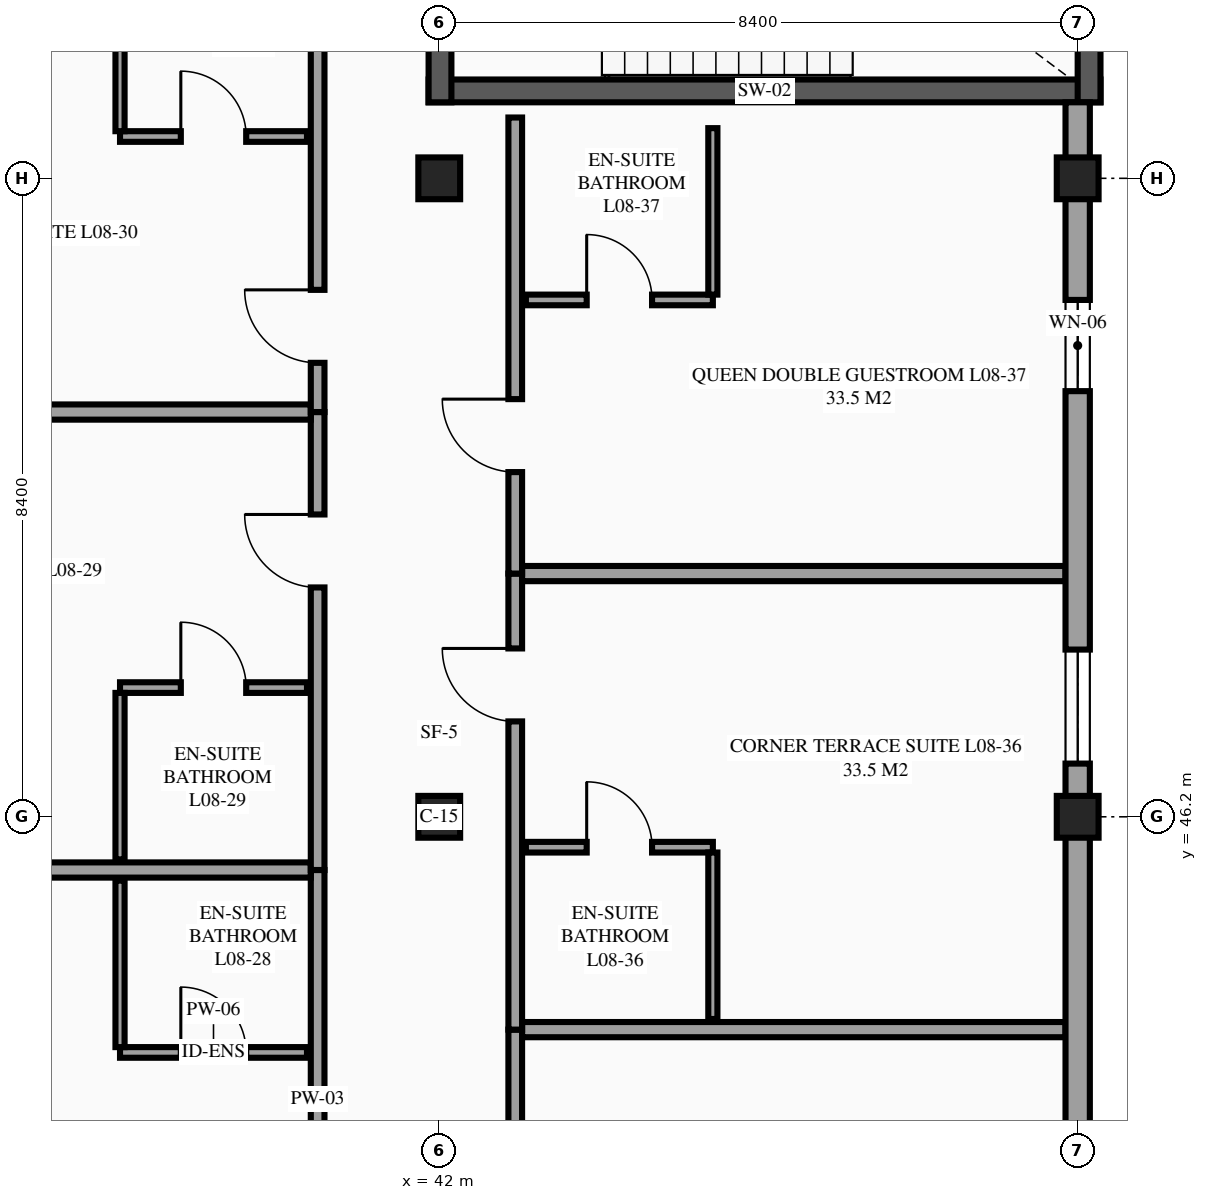
"""IFC4 building model, lengths in metres.
Left out: names, types, materials, properties, quantities, classifications, styles, units other than length and angle.
Written with IfcOpenShell. Run it as: python <this file> out.ifc"""

import sys

from ifc_helpers import new_model, si_unit, direction, frame, frame_2d, origin, origin_2d, place, context, subcontext, project, spatial, rectangle, extrude, element, fill, save


model = new_model("IFC4")
c1 = context("Model", 3, precision=1e-05, world=origin(), true_north=direction((0.0, 1.0)))
c2 = subcontext(c1, "Body", "Model", "MODEL_VIEW")
j1 = project(units=[si_unit("LENGTHUNIT", "METRE"), si_unit("PLANEANGLEUNIT", "RADIAN")], contexts=[c1])
p1 = place(None, origin())
s1 = spatial("IfcSite", under=j1, at=p1, CompositionType="ELEMENT")
p2 = place(p1, origin())
s2 = spatial("IfcBuilding", under=s1, at=p2, CompositionType="ELEMENT")
p3 = place(p2, frame((0.0, 0.0, 32.7)))
s3 = spatial("IfcBuildingStorey", under=s2, at=p3, CompositionType="ELEMENT", Elevation=32.7)
for number, where, z_axis, x_axis in (
    (1, (42.0, 46.2, 0.0), (0.0, 0.0, 1.0), (1.0, 0.0, 0.0)),
    (2, (42.0, 54.6, 0.0), (0.0, 0.0, 1.0), (1.0, 0.0, 0.0)),
    (3, (50.4, 46.2, 0.0), (0.0, 0.0, 1.0), (1.0, 0.0, 0.0)),
    (4, (50.4, 54.6, 0.0), (0.0, 0.0, 1.0), (1.0, 0.0, 0.0)),
):
    element("IfcColumn", number, at=place(p3, frame(where, z_axis=z_axis, x_axis=x_axis)), inside=s3, PredefinedType="COLUMN", context=c2, shape_type="SweptSolid", body=[
        extrude(rectangle(XDim=0.55, YDim=0.55, at=origin_2d()), origin(), (0.0, 0.0, 1.0), 3.6),
    ])
p4 = place(p3, frame((41.86, 55.75, 0.0), z_axis=(0.0, 0.0, 1.0), x_axis=(1.0, 0.0, 0.0)))
e5 = element("IfcWall", 5, at=p4, inside=s3, PredefinedType="SHEAR", context=c2, shape_type="SweptSolid", body=[
    extrude(rectangle(XDim=8.84, YDim=0.3, at=frame_2d((4.42, 0.0))), origin(), (0.0, 0.0, 1.0), 3.6),
])
p5 = place(p3, frame((50.55, 55.6, 0.0), z_axis=(0.0, 0.0, 1.0), x_axis=(0.0, 1.0, 0.0)))
e6 = element("IfcWall", 6, at=p5, inside=s3, PredefinedType="SHEAR", context=c2, shape_type="SweptSolid", body=[
    extrude(rectangle(XDim=5.2, YDim=0.3, at=frame_2d((2.6, 0.0))), origin(), (0.0, 0.0, 1.0), 3.6),
])
p6 = place(p3, frame((42.01, 60.8, 0.0), z_axis=(0.0, 0.0, 1.0), x_axis=(0.0, -1.0, 0.0)))
e7 = element("IfcWall", 7, at=p6, inside=s3, PredefinedType="SHEAR", context=c2, shape_type="SweptSolid", body=[
    extrude(rectangle(XDim=5.2, YDim=0.3, at=frame_2d((2.6, 0.0))), origin(), (0.0, 0.0, 1.0), 3.6),
])
p7 = place(p6, frame((3.0, 0.0, 0.0)))
e8 = element("IfcOpeningElement", 8, at=p7, cuts=e7, PredefinedType="OPENING", context=c2, shape_type="SweptSolid", body=[
    extrude(rectangle(XDim=1.15, YDim=2.15, at=frame_2d((0.575, 1.075))), frame((0.0, 0.16, 0.0), z_axis=(0.0, -1.0, 0.0), x_axis=(1.0, 0.0, 0.0)), (0.0, 0.0, 1.0), 0.32),
])
p8 = place(p3, frame((40.4, 39.475, 0.0), z_axis=(0.0, 0.0, 1.0), x_axis=(0.0, 1.0, 0.0)))
e9 = element("IfcWall", 9, at=p8, inside=s3, PredefinedType="PARTITIONING", context=c2, shape_type="SweptSolid", body=[
    extrude(rectangle(XDim=6.025, YDim=0.18, at=frame_2d((3.012, 0.0))), origin(), (0.0, 0.0, 1.0), 3.375),
])
p9 = place(p8, frame((1.347, 0.0, 0.0)))
e10 = element("IfcOpeningElement", 10, at=p9, cuts=e9, PredefinedType="OPENING", context=c2, shape_type="SweptSolid", body=[
    extrude(rectangle(XDim=0.96, YDim=2.15, at=frame_2d((0.48, 1.075))), frame((0.0, 0.1, 0.0), z_axis=(0.0, -1.0, 0.0), x_axis=(1.0, 0.0, 0.0)), (0.0, 0.0, 1.0), 0.2),
])
p10 = place(p3, frame((33.76, 45.5, 0.0), z_axis=(0.0, 0.0, 1.0), x_axis=(1.0, 0.0, 0.0)))
e11 = element("IfcWall", 11, at=p10, inside=s3, PredefinedType="PARTITIONING", context=c2, shape_type="SweptSolid", body=[
    extrude(rectangle(XDim=6.55, YDim=0.2, at=frame_2d((3.275, 0.0))), origin(), (0.0, 0.0, 1.0), 3.375),
])
p11 = place(p3, frame((37.8, 43.1, 0.0), z_axis=(0.0, 0.0, 1.0), x_axis=(1.0, 0.0, 0.0)))
e12 = element("IfcWall", 12, at=p11, inside=s3, PredefinedType="PARTITIONING", context=c2, shape_type="SweptSolid", body=[
    extrude(rectangle(XDim=2.46, YDim=0.14, at=frame_2d((1.23, 0.0))), origin(), (0.0, 0.0, 1.0), 3.375),
])
p12 = place(p11, frame((0.8, 0.0, 0.0)))
e13 = element("IfcOpeningElement", 13, at=p12, cuts=e12, PredefinedType="OPENING", context=c2, shape_type="SweptSolid", body=[
    extrude(rectangle(XDim=0.86, YDim=2.1, at=frame_2d((0.43, 1.05))), frame((0.0, 0.08, 0.0), z_axis=(0.0, -1.0, 0.0), x_axis=(1.0, 0.0, 0.0)), (0.0, 0.0, 1.0), 0.16),
])
p13 = place(p3, frame((37.8, 43.17, 0.0), z_axis=(0.0, 0.0, 1.0), x_axis=(0.0, 1.0, 0.0)))
e14 = element("IfcWall", 14, at=p13, inside=s3, PredefinedType="PARTITIONING", context=c2, shape_type="SweptSolid", body=[
    extrude(rectangle(XDim=2.19, YDim=0.12, at=frame_2d((1.095, 0.0))), origin(), (0.0, 0.0, 1.0), 3.375),
])
p14 = place(p3, frame((40.4, 45.5, 0.0), z_axis=(0.0, 0.0, 1.0), x_axis=(0.0, 1.0, 0.0)))
e15 = element("IfcWall", 15, at=p14, inside=s3, PredefinedType="PARTITIONING", context=c2, shape_type="SweptSolid", body=[
    extrude(rectangle(XDim=6.025, YDim=0.18, at=frame_2d((3.012, 0.0))), origin(), (0.0, 0.0, 1.0), 3.375),
])
p15 = place(p14, frame((3.718, 0.0, 0.0)))
e16 = element("IfcOpeningElement", 16, at=p15, cuts=e15, PredefinedType="OPENING", context=c2, shape_type="SweptSolid", body=[
    extrude(rectangle(XDim=0.96, YDim=2.15, at=frame_2d((0.48, 1.075))), frame((0.0, 0.1, 0.0), z_axis=(0.0, -1.0, 0.0), x_axis=(1.0, 0.0, 0.0)), (0.0, 0.0, 1.0), 0.2),
])
p16 = place(p3, frame((33.76, 51.525, 0.0), z_axis=(0.0, 0.0, 1.0), x_axis=(1.0, 0.0, 0.0)))
e17 = element("IfcWall", 17, at=p16, inside=s3, PredefinedType="PARTITIONING", context=c2, shape_type="SweptSolid", body=[
    extrude(rectangle(XDim=6.55, YDim=0.2, at=frame_2d((3.275, 0.0))), origin(), (0.0, 0.0, 1.0), 3.375),
])
p17 = place(p3, frame((37.8, 47.9, 0.0), z_axis=(0.0, 0.0, 1.0), x_axis=(1.0, 0.0, 0.0)))
e18 = element("IfcWall", 18, at=p17, inside=s3, PredefinedType="PARTITIONING", context=c2, shape_type="SweptSolid", body=[
    extrude(rectangle(XDim=2.46, YDim=0.14, at=frame_2d((1.23, 0.0))), origin(), (0.0, 0.0, 1.0), 3.375),
])
p18 = place(p17, frame((0.8, 0.0, 0.0)))
e19 = element("IfcOpeningElement", 19, at=p18, cuts=e18, PredefinedType="OPENING", context=c2, shape_type="SweptSolid", body=[
    extrude(rectangle(XDim=0.86, YDim=2.1, at=frame_2d((0.43, 1.05))), frame((0.0, 0.08, 0.0), z_axis=(0.0, -1.0, 0.0), x_axis=(1.0, 0.0, 0.0)), (0.0, 0.0, 1.0), 0.16),
])
p19 = place(p3, frame((37.8, 45.64, 0.0), z_axis=(0.0, 0.0, 1.0), x_axis=(0.0, 1.0, 0.0)))
e20 = element("IfcWall", 20, at=p19, inside=s3, PredefinedType="PARTITIONING", context=c2, shape_type="SweptSolid", body=[
    extrude(rectangle(XDim=2.19, YDim=0.12, at=frame_2d((1.095, 0.0))), origin(), (0.0, 0.0, 1.0), 3.375),
])
p20 = place(p3, frame((40.4, 51.525, 0.0), z_axis=(0.0, 0.0, 1.0), x_axis=(0.0, 1.0, 0.0)))
e21 = element("IfcWall", 21, at=p20, inside=s3, PredefinedType="PARTITIONING", context=c2, shape_type="SweptSolid", body=[
    extrude(rectangle(XDim=6.025, YDim=0.18, at=frame_2d((3.013, 0.0))), origin(), (0.0, 0.0, 1.0), 3.375),
])
p21 = place(p20, frame((0.647, 0.0, 0.0)))
e22 = element("IfcOpeningElement", 22, at=p21, cuts=e21, PredefinedType="OPENING", context=c2, shape_type="SweptSolid", body=[
    extrude(rectangle(XDim=0.96, YDim=2.15, at=frame_2d((0.48, 1.075))), frame((0.0, 0.1, 0.0), z_axis=(0.0, -1.0, 0.0), x_axis=(1.0, 0.0, 0.0)), (0.0, 0.0, 1.0), 0.2),
])
p22 = place(p3, frame((37.8, 55.15, 0.0), z_axis=(0.0, 0.0, 1.0), x_axis=(1.0, 0.0, 0.0)))
e23 = element("IfcWall", 23, at=p22, inside=s3, PredefinedType="PARTITIONING", context=c2, shape_type="SweptSolid", body=[
    extrude(rectangle(XDim=2.46, YDim=0.14, at=frame_2d((1.23, 0.0))), origin(), (0.0, 0.0, 1.0), 3.375),
])
p23 = place(p22, frame((0.8, 0.0, 0.0)))
e24 = element("IfcOpeningElement", 24, at=p23, cuts=e23, PredefinedType="OPENING", context=c2, shape_type="SweptSolid", body=[
    extrude(rectangle(XDim=0.86, YDim=2.1, at=frame_2d((0.43, 1.05))), frame((0.0, 0.08, 0.0), z_axis=(0.0, -1.0, 0.0), x_axis=(1.0, 0.0, 0.0)), (0.0, 0.0, 1.0), 0.16),
])
p24 = place(p3, frame((37.8, 55.22, 0.0), z_axis=(0.0, 0.0, 1.0), x_axis=(0.0, 1.0, 0.0)))
e25 = element("IfcWall", 25, at=p24, inside=s3, PredefinedType="PARTITIONING", context=c2, shape_type="SweptSolid", body=[
    extrude(rectangle(XDim=2.19, YDim=0.12, at=frame_2d((1.095, 0.0))), origin(), (0.0, 0.0, 1.0), 3.375),
])
p25 = place(p3, frame((43.0, 37.4, 0.0), z_axis=(0.0, 0.0, 1.0), x_axis=(0.0, 1.0, 0.0)))
e26 = element("IfcWall", 26, at=p25, inside=s3, PredefinedType="PARTITIONING", context=c2, shape_type="SweptSolid", body=[
    extrude(rectangle(XDim=6.0, YDim=0.18, at=frame_2d((3.0, 0.0))), origin(), (0.0, 0.0, 1.0), 3.375),
])
p26 = place(p25, frame((3.705, 0.0, 0.0)))
e27 = element("IfcOpeningElement", 27, at=p26, cuts=e26, PredefinedType="OPENING", context=c2, shape_type="SweptSolid", body=[
    extrude(rectangle(XDim=0.96, YDim=2.15, at=frame_2d((0.48, 1.075))), frame((0.0, 0.1, 0.0), z_axis=(0.0, -1.0, 0.0), x_axis=(1.0, 0.0, 0.0)), (0.0, 0.0, 1.0), 0.2),
])
p27 = place(p3, frame((43.09, 43.4, 0.0), z_axis=(0.0, 0.0, 1.0), x_axis=(1.0, 0.0, 0.0)))
e28 = element("IfcWall", 28, at=p27, inside=s3, PredefinedType="PARTITIONING", context=c2, shape_type="SweptSolid", body=[
    extrude(rectangle(XDim=7.15, YDim=0.2, at=frame_2d((3.575, 0.0))), origin(), (0.0, 0.0, 1.0), 3.375),
])
p28 = place(p3, frame((43.0, 43.4, 0.0), z_axis=(0.0, 0.0, 1.0), x_axis=(0.0, 1.0, 0.0)))
e29 = element("IfcWall", 29, at=p28, inside=s3, PredefinedType="PARTITIONING", context=c2, shape_type="SweptSolid", body=[
    extrude(rectangle(XDim=6.0, YDim=0.18, at=frame_2d((3.0, 0.0))), origin(), (0.0, 0.0, 1.0), 3.375),
])
p29 = place(p28, frame((4.055, 0.0, 0.0)))
e30 = element("IfcOpeningElement", 30, at=p29, cuts=e29, PredefinedType="OPENING", context=c2, shape_type="SweptSolid", body=[
    extrude(rectangle(XDim=0.96, YDim=2.15, at=frame_2d((0.48, 1.075))), frame((0.0, 0.1, 0.0), z_axis=(0.0, -1.0, 0.0), x_axis=(1.0, 0.0, 0.0)), (0.0, 0.0, 1.0), 0.2),
])
p30 = place(p3, frame((43.09, 49.4, 0.0), z_axis=(0.0, 0.0, 1.0), x_axis=(1.0, 0.0, 0.0)))
e31 = element("IfcWall", 31, at=p30, inside=s3, PredefinedType="PARTITIONING", context=c2, shape_type="SweptSolid", body=[
    extrude(rectangle(XDim=7.15, YDim=0.2, at=frame_2d((3.575, 0.0))), origin(), (0.0, 0.0, 1.0), 3.375),
])
p31 = place(p3, frame((43.14, 45.8, 0.0), z_axis=(0.0, 0.0, 1.0), x_axis=(1.0, 0.0, 0.0)))
e32 = element("IfcWall", 32, at=p31, inside=s3, PredefinedType="PARTITIONING", context=c2, shape_type="SweptSolid", body=[
    extrude(rectangle(XDim=2.46, YDim=0.14, at=frame_2d((1.23, 0.0))), origin(), (0.0, 0.0, 1.0), 3.375),
])
p32 = place(p31, frame((0.8, 0.0, 0.0)))
e33 = element("IfcOpeningElement", 33, at=p32, cuts=e32, PredefinedType="OPENING", context=c2, shape_type="SweptSolid", body=[
    extrude(rectangle(XDim=0.86, YDim=2.1, at=frame_2d((0.43, 1.05))), frame((0.0, 0.08, 0.0), z_axis=(0.0, -1.0, 0.0), x_axis=(1.0, 0.0, 0.0)), (0.0, 0.0, 1.0), 0.16),
])
p33 = place(p3, frame((45.6, 43.54, 0.0), z_axis=(0.0, 0.0, 1.0), x_axis=(0.0, 1.0, 0.0)))
e34 = element("IfcWall", 34, at=p33, inside=s3, PredefinedType="PARTITIONING", context=c2, shape_type="SweptSolid", body=[
    extrude(rectangle(XDim=2.19, YDim=0.12, at=frame_2d((1.095, 0.0))), origin(), (0.0, 0.0, 1.0), 3.375),
])
p34 = place(p3, frame((43.0, 49.4, 0.0), z_axis=(0.0, 0.0, 1.0), x_axis=(0.0, 1.0, 0.0)))
e35 = element("IfcWall", 35, at=p34, inside=s3, PredefinedType="PARTITIONING", context=c2, shape_type="SweptSolid", body=[
    extrude(rectangle(XDim=6.0, YDim=0.18, at=frame_2d((3.0, 0.0))), origin(), (0.0, 0.0, 1.0), 3.375),
])
p35 = place(p34, frame((1.335, 0.0, 0.0)))
e36 = element("IfcOpeningElement", 36, at=p35, cuts=e35, PredefinedType="OPENING", context=c2, shape_type="SweptSolid", body=[
    extrude(rectangle(XDim=0.96, YDim=2.15, at=frame_2d((0.48, 1.075))), frame((0.0, 0.1, 0.0), z_axis=(0.0, -1.0, 0.0), x_axis=(1.0, 0.0, 0.0)), (0.0, 0.0, 1.0), 0.2),
])
p36 = place(p3, frame((43.14, 53.0, 0.0), z_axis=(0.0, 0.0, 1.0), x_axis=(1.0, 0.0, 0.0)))
e37 = element("IfcWall", 37, at=p36, inside=s3, PredefinedType="PARTITIONING", context=c2, shape_type="SweptSolid", body=[
    extrude(rectangle(XDim=2.46, YDim=0.14, at=frame_2d((1.23, 0.0))), origin(), (0.0, 0.0, 1.0), 3.375),
])
p37 = place(p36, frame((0.8, 0.0, 0.0)))
e38 = element("IfcOpeningElement", 38, at=p37, cuts=e37, PredefinedType="OPENING", context=c2, shape_type="SweptSolid", body=[
    extrude(rectangle(XDim=0.86, YDim=2.1, at=frame_2d((0.43, 1.05))), frame((0.0, 0.08, 0.0), z_axis=(0.0, -1.0, 0.0), x_axis=(1.0, 0.0, 0.0)), (0.0, 0.0, 1.0), 0.16),
])
p38 = place(p3, frame((45.6, 53.07, 0.0), z_axis=(0.0, 0.0, 1.0), x_axis=(0.0, 1.0, 0.0)))
e39 = element("IfcWall", 39, at=p38, inside=s3, PredefinedType="PARTITIONING", context=c2, shape_type="SweptSolid", body=[
    extrude(rectangle(XDim=2.19, YDim=0.12, at=frame_2d((1.095, 0.0))), origin(), (0.0, 0.0, 1.0), 3.375),
])
p39 = place(p3, frame((50.4, 37.8, 0.0), z_axis=(0.0, 0.0, 1.0), x_axis=(0.0, 1.0, 0.0)))
e40 = element("IfcWall", 40, at=p39, inside=s3, PredefinedType="STANDARD", context=c2, shape_type="SweptSolid", body=[
    extrude(rectangle(XDim=8.4, YDim=0.32, at=frame_2d((4.2, 0.0))), origin(), (0.0, 0.0, 1.0), 2.58),
])
p40 = place(p39, frame((1.85, 0.0, 0.85)))
e41 = element("IfcOpeningElement", 41, at=p40, cuts=e40, PredefinedType="OPENING", context=c2, shape_type="SweptSolid", body=[
    extrude(rectangle(XDim=1.5, YDim=1.5, at=frame_2d((0.75, 0.75))), frame((0.0, 0.17, 0.0), z_axis=(0.0, -1.0, 0.0), x_axis=(1.0, 0.0, 0.0)), (0.0, 0.0, 1.0), 0.34),
])
p41 = place(p3, frame((50.4, 46.2, 0.0), z_axis=(0.0, 0.0, 1.0), x_axis=(0.0, 1.0, 0.0)))
e42 = element("IfcWall", 42, at=p41, inside=s3, PredefinedType="STANDARD", context=c2, shape_type="SweptSolid", body=[
    extrude(rectangle(XDim=8.4, YDim=0.32, at=frame_2d((4.2, 0.0))), origin(), (0.0, 0.0, 1.0), 3.126),
])
p42 = place(p41, frame((0.7, 0.0, 0.85)))
e43 = element("IfcOpeningElement", 43, at=p42, cuts=e42, PredefinedType="OPENING", context=c2, shape_type="SweptSolid", body=[
    extrude(rectangle(XDim=1.5, YDim=1.5, at=frame_2d((0.75, 0.75))), frame((0.0, 0.17, 0.0), z_axis=(0.0, -1.0, 0.0), x_axis=(1.0, 0.0, 0.0)), (0.0, 0.0, 1.0), 0.34),
])
p43 = place(p41, frame((5.6, 0.0, 0.85)))
e44 = element("IfcOpeningElement", 44, at=p43, cuts=e42, PredefinedType="OPENING", context=c2, shape_type="SweptSolid", body=[
    extrude(rectangle(XDim=1.2, YDim=1.5, at=frame_2d((0.6, 0.75))), frame((0.0, 0.17, 0.0), z_axis=(0.0, -1.0, 0.0), x_axis=(1.0, 0.0, 0.0)), (0.0, 0.0, 1.0), 0.34),
])
p44 = place(p3, frame((50.4, 54.6, 0.0), z_axis=(0.0, 0.0, 1.0), x_axis=(0.0, 1.0, 0.0)))
e45 = element("IfcWall", 45, at=p44, inside=s3, PredefinedType="STANDARD", context=c2, shape_type="SweptSolid", body=[
    extrude(rectangle(XDim=1.0, YDim=0.32, at=frame_2d((0.5, 0.0))), origin(), (0.0, 0.0, 1.0), 2.63),
])
p45 = place(p42, origin())
e46 = element("IfcWindow", 46, at=p45, inside=s3, PartitioningType="SINGLE_PANEL", PredefinedType="WINDOW", context=c2, shape_type="SweptSolid", body=[
    extrude(rectangle(XDim=1.5, YDim=1.5, at=frame_2d((0.75, 0.75))), frame((0.0, 0.03, 0.0), z_axis=(0.0, -1.0, 0.0), x_axis=(1.0, 0.0, 0.0)), (0.0, 0.0, 1.0), 0.06),
])
fill(e43, e46)
p46 = place(p43, origin())
e47 = element("IfcWindow", 47, at=p46, inside=s3, PartitioningType="SINGLE_PANEL", PredefinedType="WINDOW", context=c2, shape_type="SweptSolid", body=[
    extrude(rectangle(XDim=1.2, YDim=1.5, at=frame_2d((0.6, 0.75))), frame((0.0, 0.03, 0.0), z_axis=(0.0, -1.0, 0.0), x_axis=(1.0, 0.0, 0.0)), (0.0, 0.0, 1.0), 0.06),
])
fill(e44, e47)
p47 = place(p12, origin())
e48 = element("IfcDoor", 48, at=p47, inside=s3, OperationType="SINGLE_SWING_LEFT", PredefinedType="DOOR", context=c2, shape_type="SweptSolid", body=[
    extrude(rectangle(XDim=0.86, YDim=2.1, at=frame_2d((0.43, 1.05))), frame((0.0, 0.025, 0.0), z_axis=(0.0, -1.0, 0.0), x_axis=(1.0, 0.0, 0.0)), (0.0, 0.0, 1.0), 0.05),
])
fill(e13, e48)
p48 = place(p15, origin())
e49 = element("IfcDoor", 49, at=p48, inside=s3, OperationType="SINGLE_SWING_RIGHT", PredefinedType="DOOR", context=c2, shape_type="SweptSolid", body=[
    extrude(rectangle(XDim=0.96, YDim=2.15, at=frame_2d((0.48, 1.075))), frame((0.0, 0.025, 0.0), z_axis=(0.0, -1.0, 0.0), x_axis=(1.0, 0.0, 0.0)), (0.0, 0.0, 1.0), 0.05),
])
fill(e16, e49)
p49 = place(p18, origin())
e50 = element("IfcDoor", 50, at=p49, inside=s3, OperationType="SINGLE_SWING_LEFT", PredefinedType="DOOR", context=c2, shape_type="SweptSolid", body=[
    extrude(rectangle(XDim=0.86, YDim=2.1, at=frame_2d((0.43, 1.05))), frame((0.0, 0.025, 0.0), z_axis=(0.0, -1.0, 0.0), x_axis=(1.0, 0.0, 0.0)), (0.0, 0.0, 1.0), 0.05),
])
fill(e19, e50)
p50 = place(p21, origin())
e51 = element("IfcDoor", 51, at=p50, inside=s3, OperationType="SINGLE_SWING_RIGHT", PredefinedType="DOOR", context=c2, shape_type="SweptSolid", body=[
    extrude(rectangle(XDim=0.96, YDim=2.15, at=frame_2d((0.48, 1.075))), frame((0.0, 0.025, 0.0), z_axis=(0.0, -1.0, 0.0), x_axis=(1.0, 0.0, 0.0)), (0.0, 0.0, 1.0), 0.05),
])
fill(e22, e51)
p51 = place(p23, origin())
e52 = element("IfcDoor", 52, at=p51, inside=s3, OperationType="SINGLE_SWING_LEFT", PredefinedType="DOOR", context=c2, shape_type="SweptSolid", body=[
    extrude(rectangle(XDim=0.86, YDim=2.1, at=frame_2d((0.43, 1.05))), frame((0.0, 0.025, 0.0), z_axis=(0.0, -1.0, 0.0), x_axis=(1.0, 0.0, 0.0)), (0.0, 0.0, 1.0), 0.05),
])
fill(e24, e52)
p52 = place(p29, origin())
e53 = element("IfcDoor", 53, at=p52, inside=s3, OperationType="SINGLE_SWING_RIGHT", PredefinedType="DOOR", context=c2, shape_type="SweptSolid", body=[
    extrude(rectangle(XDim=0.96, YDim=2.15, at=frame_2d((0.48, 1.075))), frame((0.0, 0.025, 0.0), z_axis=(0.0, -1.0, 0.0), x_axis=(1.0, 0.0, 0.0)), (0.0, 0.0, 1.0), 0.05),
])
fill(e30, e53)
p53 = place(p32, origin())
e54 = element("IfcDoor", 54, at=p53, inside=s3, OperationType="SINGLE_SWING_LEFT", PredefinedType="DOOR", context=c2, shape_type="SweptSolid", body=[
    extrude(rectangle(XDim=0.86, YDim=2.1, at=frame_2d((0.43, 1.05))), frame((0.0, 0.025, 0.0), z_axis=(0.0, -1.0, 0.0), x_axis=(1.0, 0.0, 0.0)), (0.0, 0.0, 1.0), 0.05),
])
fill(e33, e54)
p54 = place(p35, origin())
e55 = element("IfcDoor", 55, at=p54, inside=s3, OperationType="SINGLE_SWING_RIGHT", PredefinedType="DOOR", context=c2, shape_type="SweptSolid", body=[
    extrude(rectangle(XDim=0.96, YDim=2.15, at=frame_2d((0.48, 1.075))), frame((0.0, 0.025, 0.0), z_axis=(0.0, -1.0, 0.0), x_axis=(1.0, 0.0, 0.0)), (0.0, 0.0, 1.0), 0.05),
])
fill(e36, e55)
p55 = place(p37, origin())
e56 = element("IfcDoor", 56, at=p55, inside=s3, OperationType="SINGLE_SWING_LEFT", PredefinedType="DOOR", context=c2, shape_type="SweptSolid", body=[
    extrude(rectangle(XDim=0.86, YDim=2.1, at=frame_2d((0.43, 1.05))), frame((0.0, 0.025, 0.0), z_axis=(0.0, -1.0, 0.0), x_axis=(1.0, 0.0, 0.0)), (0.0, 0.0, 1.0), 0.05),
])
fill(e38, e56)
save(model, sys.argv[1])
